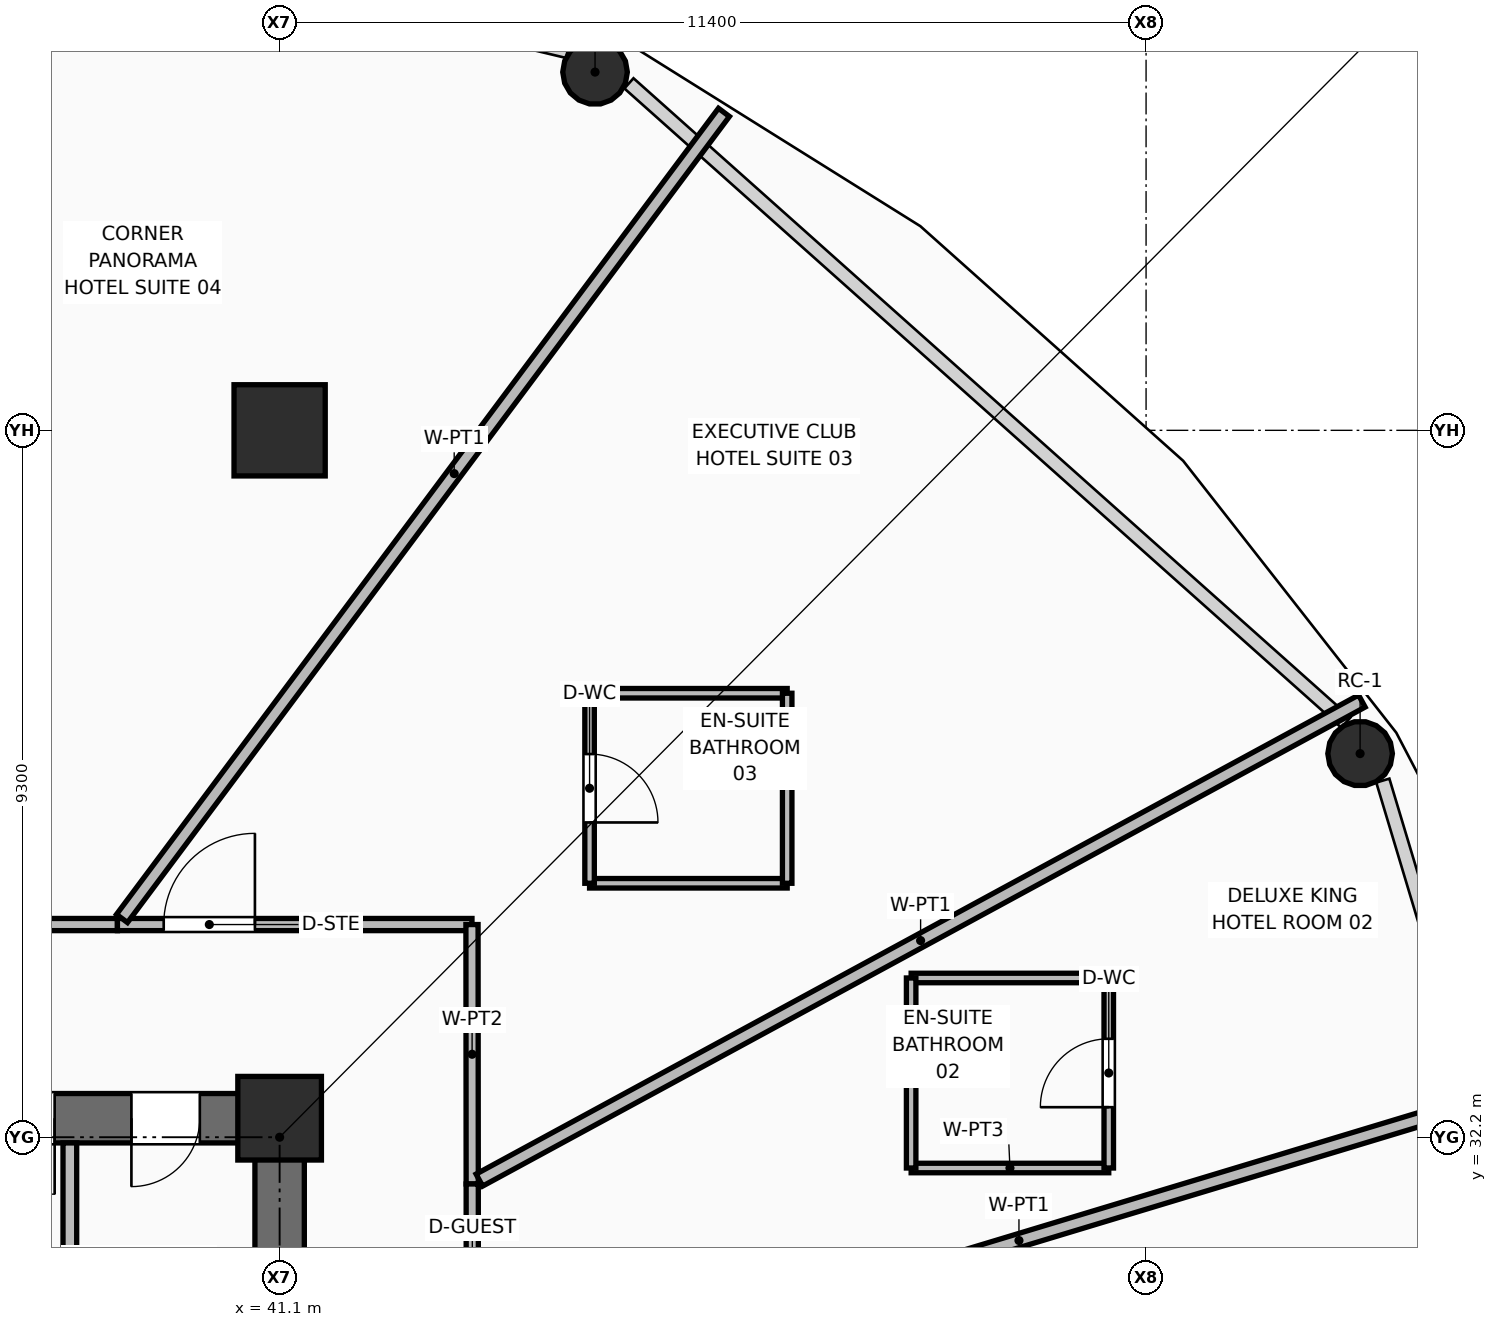
"""IFC4 building model, lengths in metres.
Left out: names, types, materials, properties, quantities, classifications, styles, units other than length and angle.
Written with IfcOpenShell. Run it as: python <this file> out.ifc"""

import sys

from ifc_helpers import new_model, si_unit, direction, frame, frame_2d, origin, origin_2d, place, context, subcontext, project, spatial, rectangle, hollow_rectangle, hollow_circle, extrude, element, fill, save


model = new_model("IFC4")
c1 = context("Model", 3, precision=1e-05, world=origin(), true_north=direction((0.0, 1.0)))
c2 = subcontext(c1, "Body", "Model", "MODEL_VIEW")
j1 = project(units=[si_unit("LENGTHUNIT", "METRE"), si_unit("PLANEANGLEUNIT", "RADIAN")], contexts=[c1])
p1 = place(None, origin())
s1 = spatial("IfcSite", under=j1, at=p1, CompositionType="ELEMENT")
p2 = place(p1, origin())
s2 = spatial("IfcBuilding", under=s1, at=p2, CompositionType="ELEMENT")
p3 = place(p2, frame((0.0, 0.0, 83.25)))
s3 = spatial("IfcBuildingStorey", under=s2, at=p3, CompositionType="ELEMENT", Elevation=83.25)
p4 = place(p3, frame((41.1, 32.45, 0.0), z_axis=(0.0, 0.0, 1.0), x_axis=(1.0, 0.0, 0.0)))
e1 = element("IfcColumn", 1, at=p4, inside=s3, PredefinedType="COLUMN", context=c2, shape_type="SweptSolid", body=[
    extrude(rectangle(XDim=1.1, YDim=1.1, at=origin_2d()), origin(), (0.0, 0.0, 1.0), 3.75),
])
p5 = place(p3, frame((41.1, 41.5, 0.0), z_axis=(0.0, 0.0, 1.0), x_axis=(1.0, 0.0, 0.0)))
e2 = element("IfcColumn", 2, at=p5, inside=s3, PredefinedType="COLUMN", context=c2, shape_type="SweptSolid", body=[
    extrude(hollow_rectangle(XDim=1.2, YDim=1.2, WallThickness=0.045, at=origin_2d()), origin(), (0.0, 0.0, 1.0), 3.75),
])
for number, where, z_axis, x_axis in (
    (3, (55.316, 37.247, 0.0), (0.0, 0.0, 1.0), (1.0, 0.0, 0.0)),
    (4, (45.25, 46.213, 0.0), (0.0, 0.0, 1.0), (1.0, 0.0, 0.0)),
):
    element("IfcColumn", number, at=place(p3, frame(where, z_axis=z_axis, x_axis=x_axis)), inside=s3, PredefinedType="COLUMN", context=c2, shape_type="SweptSolid", body=[
        extrude(hollow_circle(Radius=0.425, WallThickness=0.04, at=origin_2d()), origin(), (0.0, 0.0, 1.0), 3.57),
    ])
p6 = place(p3, frame((21.575, 32.45, 0.0), z_axis=(0.0, 0.0, 1.0), x_axis=(1.0, 0.0, 0.0)))
e5 = element("IfcWall", 5, at=p6, inside=s3, PredefinedType="SHEAR", context=c2, shape_type="SweptSolid", body=[
    extrude(rectangle(XDim=19.85, YDim=0.65, at=frame_2d((9.925, 0.0))), origin(), (0.0, 0.0, 1.0), 3.57),
])
p7 = place(p6, frame((2.175, 0.0, 0.0)))
e6 = element("IfcOpeningElement", 6, at=p7, cuts=e5, PredefinedType="OPENING", context=c2, shape_type="SweptSolid", body=[
    extrude(rectangle(XDim=1.1, YDim=2.1, at=frame_2d((0.55, 1.05))), frame((0.0, 0.335, 0.0), z_axis=(0.0, -1.0, 0.0), x_axis=(1.0, 0.0, 0.0)), (0.0, 0.0, 1.0), 0.67),
])
p8 = place(p6, frame((15.565, 0.0, 0.0)))
e7 = element("IfcOpeningElement", 7, at=p8, cuts=e5, PredefinedType="OPENING", context=c2, shape_type="SweptSolid", body=[
    extrude(rectangle(XDim=1.0, YDim=2.1, at=frame_2d((0.5, 1.05))), frame((0.0, 0.335, 0.0), z_axis=(0.0, -1.0, 0.0), x_axis=(1.0, 0.0, 0.0)), (0.0, 0.0, 1.0), 0.67),
])
p9 = place(p6, frame((17.575, 0.0, 0.0)))
e8 = element("IfcOpeningElement", 8, at=p9, cuts=e5, PredefinedType="OPENING", context=c2, shape_type="SweptSolid", body=[
    extrude(rectangle(XDim=0.9, YDim=2.1, at=frame_2d((0.45, 1.05))), frame((0.0, 0.335, 0.0), z_axis=(0.0, -1.0, 0.0), x_axis=(1.0, 0.0, 0.0)), (0.0, 0.0, 1.0), 0.67),
])
p10 = place(p3, frame((41.1, 18.125, 0.0), z_axis=(0.0, 0.0, 1.0), x_axis=(0.0, 1.0, 0.0)))
e9 = element("IfcWall", 9, at=p10, inside=s3, PredefinedType="SHEAR", context=c2, shape_type="SweptSolid", body=[
    extrude(rectangle(XDim=14.0, YDim=0.65, at=frame_2d((7.0, 0.0))), origin(), (0.0, 0.0, 1.0), 3.57),
])
p11 = place(p10, frame((3.335, 0.0, 0.0)))
e10 = element("IfcOpeningElement", 10, at=p11, cuts=e9, PredefinedType="OPENING", context=c2, shape_type="SweptSolid", body=[
    extrude(rectangle(XDim=1.05, YDim=2.1, at=frame_2d((0.525, 1.05))), frame((0.0, 0.335, 0.0), z_axis=(0.0, -1.0, 0.0), x_axis=(1.0, 0.0, 0.0)), (0.0, 0.0, 1.0), 0.67),
])
p12 = place(p3, frame((38.34, 28.62, 0.0), z_axis=(0.0, 0.0, 1.0), x_axis=(0.0, 1.0, 0.0)))
e11 = element("IfcWall", 11, at=p12, inside=s3, PredefinedType="PARTITIONING", context=c2, shape_type="SweptSolid", body=[
    extrude(rectangle(XDim=3.505, YDim=0.18, at=frame_2d((1.752, 0.0))), origin(), (0.0, 0.0, 1.0), 3.55),
])
p13 = place(p3, frame((33.056, 34.998, 0.0), z_axis=(0.0, 0.0, 1.0), x_axis=(1.0, 0.0, 0.0)))
e12 = element("IfcWall", 12, at=p13, inside=s3, PredefinedType="PARTITIONING", context=c2, shape_type="SweptSolid", body=[
    extrude(rectangle(XDim=5.91, YDim=0.16, at=frame_2d((2.955, 0.0))), origin(), (0.0, 0.0, 1.0), 3.55),
])
p14 = place(p13, frame((2.355, 0.0, 0.0)))
e13 = element("IfcOpeningElement", 13, at=p14, cuts=e12, PredefinedType="OPENING", context=c2, shape_type="SweptSolid", body=[
    extrude(rectangle(XDim=1.2, YDim=2.1, at=frame_2d((0.6, 1.05))), frame((0.0, 0.09, 0.0), z_axis=(0.0, -1.0, 0.0), x_axis=(1.0, 0.0, 0.0)), (0.0, 0.0, 1.0), 0.18),
])
p15 = place(p3, frame((38.966, 34.998, 0.0), z_axis=(0.0, 0.0, 1.0), x_axis=(1.0, 0.0, 0.0)))
e14 = element("IfcWall", 14, at=p15, inside=s3, PredefinedType="PARTITIONING", context=c2, shape_type="SweptSolid", body=[
    extrude(rectangle(XDim=4.665, YDim=0.16, at=frame_2d((2.333, 0.0))), origin(), (0.0, 0.0, 1.0), 2.928),
])
p16 = place(p15, frame((0.609, 0.0, 0.0)))
e15 = element("IfcOpeningElement", 15, at=p16, cuts=e14, PredefinedType="OPENING", context=c2, shape_type="SweptSolid", body=[
    extrude(rectangle(XDim=1.2, YDim=2.1, at=frame_2d((0.6, 1.05))), frame((0.0, 0.09, 0.0), z_axis=(0.0, -1.0, 0.0), x_axis=(1.0, 0.0, 0.0)), (0.0, 0.0, 1.0), 0.18),
])
p17 = place(p3, frame((43.631, 34.998, 0.0), z_axis=(0.0, 0.0, 1.0), x_axis=(0.000858368782, -0.999999631601, 0.0)))
e16 = element("IfcWall", 16, at=p17, inside=s3, PredefinedType="PARTITIONING", context=c2, shape_type="SweptSolid", body=[
    extrude(rectangle(XDim=3.413, YDim=0.16, at=frame_2d((1.707, 0.0))), origin(), (0.0, 0.0, 1.0), 2.928),
])
p18 = place(p3, frame((43.634, 31.585, 0.0), z_axis=(0.0, 0.0, 1.0), x_axis=(0.000669567978, -0.999999775839, 0.0)))
e17 = element("IfcWall", 17, at=p18, inside=s3, PredefinedType="PARTITIONING", context=c2, shape_type="SweptSolid", body=[
    extrude(rectangle(XDim=2.917, YDim=0.16, at=frame_2d((1.458, 0.0))), origin(), (0.0, 0.0, 1.0), 3.55),
])
p19 = place(p18, frame((1.321, 0.0, 0.0)))
e18 = element("IfcOpeningElement", 18, at=p19, cuts=e17, PredefinedType="OPENING", context=c2, shape_type="SweptSolid", body=[
    extrude(rectangle(XDim=1.0, YDim=2.1, at=frame_2d((0.5, 1.05))), frame((0.0, 0.09, 0.0), z_axis=(0.0, -1.0, 0.0), x_axis=(1.0, 0.0, 0.0)), (0.0, 0.0, 1.0), 0.18),
])
p20 = place(p3, frame((43.728, 28.695, 0.0), z_axis=(0.0, 0.0, 1.0), x_axis=(0.957224891777, 0.289344961183, 0.0)))
e19 = element("IfcWall", 19, at=p20, inside=s3, PredefinedType="PARTITIONING", context=c2, shape_type="SweptSolid", body=[
    extrude(rectangle(XDim=14.833, YDim=0.18, at=frame_2d((7.417, 0.0))), origin(), (0.0, 0.0, 1.0), 2.775),
])
p21 = place(p3, frame((43.728, 31.636, 0.0), z_axis=(0.0, 0.0, 1.0), x_axis=(0.878890179317, 0.477024163643, 0.0)))
e20 = element("IfcWall", 20, at=p21, inside=s3, PredefinedType="PARTITIONING", context=c2, shape_type="SweptSolid", body=[
    extrude(rectangle(XDim=13.211, YDim=0.18, at=frame_2d((6.605, 0.0))), origin(), (0.0, 0.0, 1.0), 2.775),
])
p22 = place(p3, frame((39.026, 35.078, 0.0), z_axis=(0.0, 0.0, 1.0), x_axis=(0.598366758348, 0.801222330258, 0.0)))
e21 = element("IfcWall", 21, at=p22, inside=s3, PredefinedType="PARTITIONING", context=c2, shape_type="SweptSolid", body=[
    extrude(rectangle(XDim=13.236, YDim=0.18, at=frame_2d((6.618, 0.0))), origin(), (0.0, 0.0, 1.0), 2.775),
])
for number, where, z_axis, x_axis in (
    (22, (49.409, 31.795, 0.0), (0.0, 0.0, 1.0), (1.0, 0.0, 0.0)),
    (23, (49.409, 34.295, 0.0), (0.0, 0.0, 1.0), (1.0, 0.0, 0.0)),
):
    element("IfcWall", number, at=place(p3, frame(where, z_axis=z_axis, x_axis=x_axis)), inside=s3, PredefinedType="PARTITIONING", context=c2, shape_type="SweptSolid", body=[
        extrude(rectangle(XDim=2.6, YDim=0.125, at=frame_2d((1.3, 0.0))), origin(), (0.0, 0.0, 1.0), 3.55),
    ])
p23 = place(p3, frame((49.409, 31.795, 0.0), z_axis=(0.0, 0.0, 1.0), x_axis=(0.0, 1.0, 0.0)))
e24 = element("IfcWall", 24, at=p23, inside=s3, PredefinedType="PARTITIONING", context=c2, shape_type="SweptSolid", body=[
    extrude(rectangle(XDim=2.5, YDim=0.125, at=frame_2d((1.25, 0.0))), origin(), (0.0, 0.0, 1.0), 3.55),
])
p24 = place(p3, frame((52.009, 31.795, 0.0), z_axis=(0.0, 0.0, 1.0), x_axis=(0.0, 1.0, 0.0)))
e25 = element("IfcWall", 25, at=p24, inside=s3, PredefinedType="PARTITIONING", context=c2, shape_type="SweptSolid", body=[
    extrude(rectangle(XDim=2.5, YDim=0.125, at=frame_2d((1.25, 0.0))), origin(), (0.0, 0.0, 1.0), 3.55),
])
p25 = place(p24, frame((0.8, 0.0, 0.0)))
e26 = element("IfcOpeningElement", 26, at=p25, cuts=e25, PredefinedType="OPENING", context=c2, shape_type="SweptSolid", body=[
    extrude(rectangle(XDim=0.9, YDim=2.1, at=frame_2d((0.45, 1.05))), frame((0.0, 0.073, 0.0), z_axis=(0.0, -1.0, 0.0), x_axis=(1.0, 0.0, 0.0)), (0.0, 0.0, 1.0), 0.145),
])
for number, where, z_axis, x_axis in (
    (27, (45.178, 35.541, 0.0), (0.0, 0.0, 1.0), (1.0, 0.0, 0.0)),
    (28, (45.178, 38.041, 0.0), (0.0, 0.0, 1.0), (1.0, 0.0, 0.0)),
):
    element("IfcWall", number, at=place(p3, frame(where, z_axis=z_axis, x_axis=x_axis)), inside=s3, PredefinedType="PARTITIONING", context=c2, shape_type="SweptSolid", body=[
        extrude(rectangle(XDim=2.6, YDim=0.125, at=frame_2d((1.3, 0.0))), origin(), (0.0, 0.0, 1.0), 3.55),
    ])
p26 = place(p3, frame((45.178, 35.541, 0.0), z_axis=(0.0, 0.0, 1.0), x_axis=(0.0, 1.0, 0.0)))
e29 = element("IfcWall", 29, at=p26, inside=s3, PredefinedType="PARTITIONING", context=c2, shape_type="SweptSolid", body=[
    extrude(rectangle(XDim=2.5, YDim=0.125, at=frame_2d((1.25, 0.0))), origin(), (0.0, 0.0, 1.0), 3.55),
])
p27 = place(p26, frame((0.8, 0.0, 0.0)))
e30 = element("IfcOpeningElement", 30, at=p27, cuts=e29, PredefinedType="OPENING", context=c2, shape_type="SweptSolid", body=[
    extrude(rectangle(XDim=0.9, YDim=2.1, at=frame_2d((0.45, 1.05))), frame((0.0, 0.073, 0.0), z_axis=(0.0, -1.0, 0.0), x_axis=(1.0, 0.0, 0.0)), (0.0, 0.0, 1.0), 0.145),
])
p28 = place(p3, frame((47.778, 35.541, 0.0), z_axis=(0.0, 0.0, 1.0), x_axis=(0.0, 1.0, 0.0)))
e31 = element("IfcWall", 31, at=p28, inside=s3, PredefinedType="PARTITIONING", context=c2, shape_type="SweptSolid", body=[
    extrude(rectangle(XDim=2.5, YDim=0.125, at=frame_2d((1.25, 0.0))), origin(), (0.0, 0.0, 1.0), 3.55),
])
p29 = place(p8, frame((1.0, 0.0, 0.0), z_axis=(0.0, 0.0, 1.0), x_axis=(-1.0, 0.0, 0.0)))
e32 = element("IfcDoor", 32, at=p29, inside=s3, OperationType="SINGLE_SWING_LEFT", PredefinedType="DOOR", context=c2, shape_type="SweptSolid", body=[
    extrude(rectangle(XDim=1.0, YDim=2.1, at=frame_2d((0.5, 1.05))), frame((0.0, 0.025, 0.0), z_axis=(0.0, -1.0, 0.0), x_axis=(1.0, 0.0, 0.0)), (0.0, 0.0, 1.0), 0.05),
])
fill(e7, e32)
p30 = place(p9, frame((0.9, 0.0, 0.0), z_axis=(0.0, 0.0, 1.0), x_axis=(-1.0, 0.0, 0.0)))
e33 = element("IfcDoor", 33, at=p30, inside=s3, OperationType="SINGLE_SWING_RIGHT", PredefinedType="DOOR", context=c2, shape_type="SweptSolid", body=[
    extrude(rectangle(XDim=0.9, YDim=2.1, at=frame_2d((0.45, 1.05))), frame((0.0, 0.025, 0.0), z_axis=(0.0, -1.0, 0.0), x_axis=(1.0, 0.0, 0.0)), (0.0, 0.0, 1.0), 0.05),
])
fill(e8, e33)
p31 = place(p25, origin())
e34 = element("IfcDoor", 34, at=p31, inside=s3, OperationType="SINGLE_SWING_LEFT", PredefinedType="DOOR", context=c2, shape_type="SweptSolid", body=[
    extrude(rectangle(XDim=0.9, YDim=2.1, at=frame_2d((0.45, 1.05))), frame((0.0, 0.025, 0.0), z_axis=(0.0, -1.0, 0.0), x_axis=(1.0, 0.0, 0.0)), (0.0, 0.0, 1.0), 0.05),
])
fill(e26, e34)
p32 = place(p27, frame((0.9, 0.0, 0.0), z_axis=(0.0, 0.0, 1.0), x_axis=(-1.0, 0.0, 0.0)))
e35 = element("IfcDoor", 35, at=p32, inside=s3, OperationType="SINGLE_SWING_RIGHT", PredefinedType="DOOR", context=c2, shape_type="SweptSolid", body=[
    extrude(rectangle(XDim=0.9, YDim=2.1, at=frame_2d((0.45, 1.05))), frame((0.0, 0.025, 0.0), z_axis=(0.0, -1.0, 0.0), x_axis=(1.0, 0.0, 0.0)), (0.0, 0.0, 1.0), 0.05),
])
fill(e30, e35)
p33 = place(p16, origin())
e36 = element("IfcDoor", 36, at=p33, inside=s3, OperationType="SINGLE_SWING_RIGHT", PredefinedType="DOOR", context=c2, shape_type="SweptSolid", body=[
    extrude(rectangle(XDim=1.2, YDim=2.1, at=frame_2d((0.6, 1.05))), frame((0.0, 0.025, 0.0), z_axis=(0.0, -1.0, 0.0), x_axis=(1.0, 0.0, 0.0)), (0.0, 0.0, 1.0), 0.05),
])
fill(e15, e36)
save(model, sys.argv[1])
